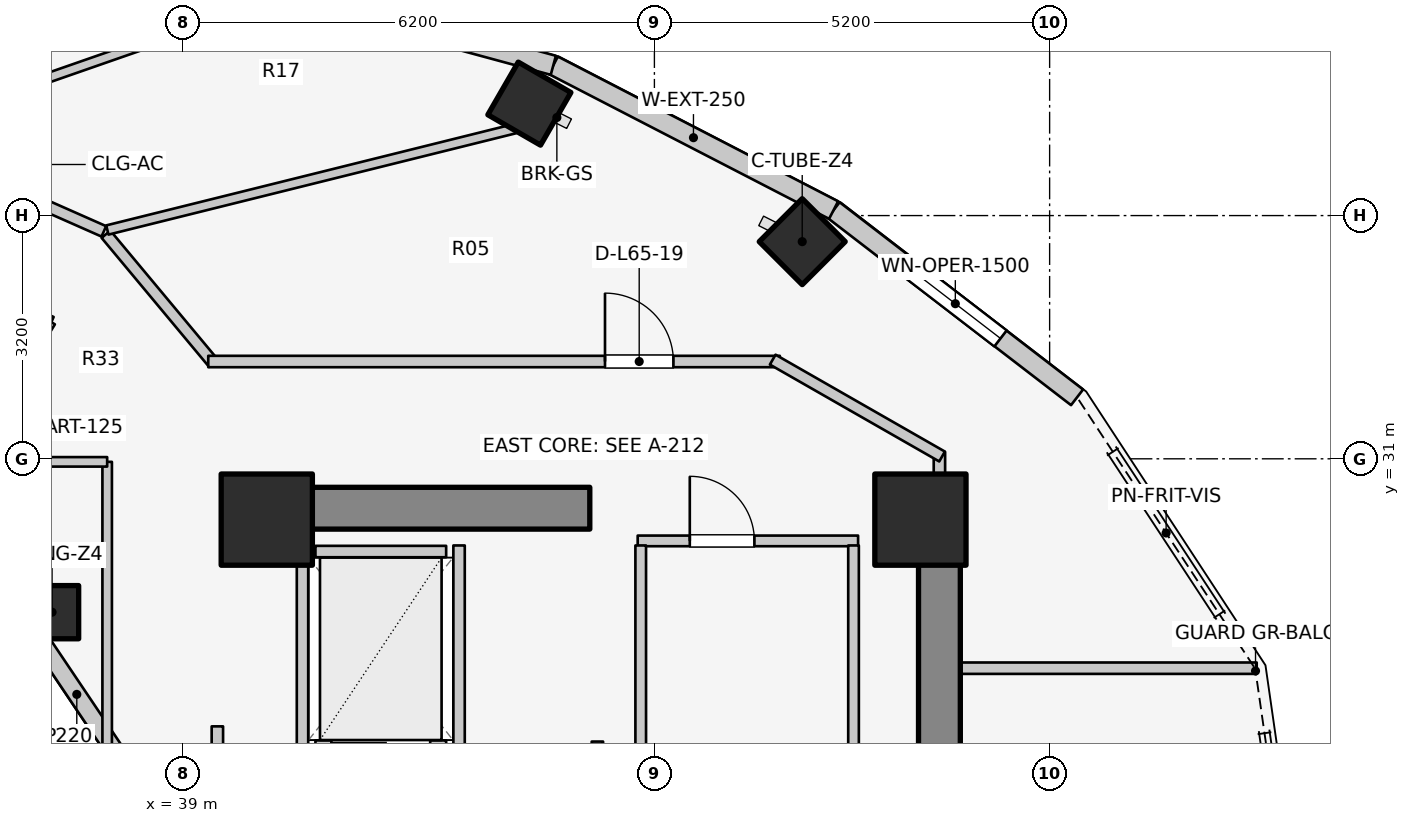
"""IFC4 building model, lengths in metres.
Left out: names, types, materials, properties, quantities, classifications, styles, units other than length and angle.
Written with IfcOpenShell. Run it as: python <this file> out.ifc"""

import sys

from ifc_helpers import new_model, si_unit, direction, frame, frame_2d, origin, origin_2d, place, context, subcontext, project, spatial, rectangle, extrude, element, fill, save


model = new_model("IFC4")
c1 = context("Model", 3, precision=1e-05, world=origin(), true_north=direction((0.0, 1.0)))
c2 = subcontext(c1, "Body", "Model", "MODEL_VIEW")
j1 = project(units=[si_unit("LENGTHUNIT", "METRE"), si_unit("PLANEANGLEUNIT", "RADIAN")], contexts=[c1])
p1 = place(None, origin())
s1 = spatial("IfcSite", under=j1, at=p1, CompositionType="ELEMENT")
p2 = place(p1, origin())
s2 = spatial("IfcBuilding", under=s1, at=p2, CompositionType="ELEMENT")
p3 = place(p2, frame((0.0, 0.0, 214.0)))
s3 = spatial("IfcBuildingStorey", under=s2, at=p3, CompositionType="ELEMENT", Elevation=214.0)
p4 = place(p3, frame((48.95, 17.05, 0.0), z_axis=(0.0, 0.0, 1.0), x_axis=(0.0, 1.0, 0.0)))
e1 = element("IfcWall", 1, at=p4, inside=s3, PredefinedType="SHEAR", context=c2, shape_type="SweptSolid", body=[
    extrude(rectangle(XDim=12.8, YDim=0.55, at=frame_2d((6.4, 0.0))), origin(), (0.0, 0.0, 1.0), 3.1),
])
p5 = place(p3, frame((39.85, 30.35, 0.0), z_axis=(0.0, 0.0, 1.0), x_axis=(1.0, 0.0, 0.0)))
e2 = element("IfcWall", 2, at=p5, inside=s3, PredefinedType="SHEAR", context=c2, shape_type="SweptSolid", body=[
    extrude(rectangle(XDim=4.5, YDim=0.55, at=frame_2d((2.25, 0.0))), origin(), (0.0, 0.0, 1.0), 3.1),
])
for number, where, z_axis, x_axis in (
    (3, (48.7, 30.2, 0.0), (0.0, 0.0, 1.0), (1.0, 0.0, 0.0)),
    (4, (40.1, 30.2, 0.0), (0.0, 0.0, 1.0), (1.0, 0.0, 0.0)),
):
    element("IfcColumn", number, at=place(p3, frame(where, z_axis=z_axis, x_axis=x_axis)), inside=s3, PredefinedType="COLUMN", context=c2, shape_type="SweptSolid", body=[
        extrude(rectangle(XDim=1.2, YDim=1.2, at=origin_2d()), origin(), (0.0, 0.0, 1.0), 3.1),
    ])
p6 = place(p3, frame((37.275, 28.982, 0.0), z_axis=(0.0, 0.0, 1.0), x_axis=(1.0, 0.0, 0.0)))
e5 = element("IfcColumn", 5, at=p6, inside=s3, PredefinedType="COLUMN", context=c2, shape_type="SweptSolid", body=[
    extrude(rectangle(XDim=0.7, YDim=0.7, at=origin_2d()), origin(), (0.0, 0.0, 1.0), 3.1),
])
for number, where, z_axis, x_axis in (
    (6, (47.145, 33.857, 0.0), (0.0, 0.0, 1.0), (0.707, 0.707, 0.0)),
    (7, (43.555, 35.673, 0.0), (0.0, 0.0, 1.0), (0.5, 0.866, 0.0)),
):
    element("IfcColumn", number, at=place(p3, frame(where, z_axis=z_axis, x_axis=x_axis)), inside=s3, PredefinedType="COLUMN", context=c2, shape_type="SweptSolid", body=[
        extrude(rectangle(XDim=0.8, YDim=0.8, at=origin_2d()), origin(), (0.0, 0.0, 1.0), 3.1),
    ])
p7 = place(p3, frame((38.166, 27.06, 0.0), z_axis=(0.0, 0.0, 1.0), x_axis=(-0.558197800898, 0.829707909492, 0.0)))
e8 = element("IfcWall", 8, at=p7, inside=s3, PredefinedType="STANDARD", context=c2, shape_type="SweptSolid", body=[
    extrude(rectangle(XDim=2.027, YDim=0.23, at=frame_2d((1.013, 0.0))), origin(), (0.0, 0.0, 1.0), 2.16),
])
p8 = place(p3, frame((50.761, 31.809, 0.0), z_axis=(0.0, 0.0, 1.0), x_axis=(-0.792713817907, 0.609593965603, 0.0)))
e9 = element("IfcWall", 9, at=p8, inside=s3, PredefinedType="STANDARD", context=c2, shape_type="SweptSolid", body=[
    extrude(rectangle(XDim=4.041, YDim=0.26, at=frame_2d((2.021, 0.0))), origin(), (0.0, 0.0, 1.0), 2.85),
])
p9 = place(p8, frame((1.271, 0.0, 0.75)))
e10 = element("IfcOpeningElement", 10, at=p9, cuts=e9, PredefinedType="OPENING", context=c2, shape_type="SweptSolid", body=[
    extrude(rectangle(XDim=1.5, YDim=1.6, at=frame_2d((0.75, 0.8))), frame((0.0, 0.14, 0.0), z_axis=(0.0, -1.0, 0.0), x_axis=(1.0, 0.0, 0.0)), (0.0, 0.0, 1.0), 0.28),
])
p10 = place(p3, frame((47.558, 34.272, 0.0), z_axis=(0.0, 0.0, 1.0), x_axis=(-0.88849146803, 0.458893137057, 0.0)))
e11 = element("IfcWall", 11, at=p10, inside=s3, PredefinedType="STANDARD", context=c2, shape_type="SweptSolid", body=[
    extrude(rectangle(XDim=4.15, YDim=0.26, at=frame_2d((2.075, 0.0))), origin(), (0.0, 0.0, 1.0), 2.85),
])
p11 = place(p3, frame((43.87, 36.177, 0.0), z_axis=(0.0, 0.0, 1.0), x_axis=(-0.965213026382, 0.261464746576, 0.0)))
e12 = element("IfcWall", 12, at=p11, inside=s3, PredefinedType="STANDARD", context=c2, shape_type="SweptSolid", body=[
    extrude(rectangle(XDim=5.001, YDim=0.26, at=frame_2d((2.5, 0.0))), origin(), (0.0, 0.0, 1.0), 2.85),
])
p12 = place(p11, frame((1.301, 0.0, 0.75)))
e13 = element("IfcOpeningElement", 13, at=p12, cuts=e12, PredefinedType="OPENING", context=c2, shape_type="SweptSolid", body=[
    extrude(rectangle(XDim=2.4, YDim=1.7, at=frame_2d((1.2, 0.85))), frame((0.0, 0.14, 0.0), z_axis=(0.0, -1.0, 0.0), x_axis=(1.0, 0.0, 0.0)), (0.0, 0.0, 1.0), 0.28),
])
p13 = place(p3, frame((40.74, 27.22, 0.0), z_axis=(0.0, 0.0, 1.0), x_axis=(1.0, 0.0, 0.0)))
e14 = element("IfcWall", 14, at=p13, inside=s3, PredefinedType="SOLIDWALL", context=c2, shape_type="SweptSolid", body=[
    extrude(rectangle(XDim=1.72, YDim=0.15, at=frame_2d((0.86, 0.0))), origin(), (0.0, 0.0, 1.0), 2.855),
])
p14 = place(p13, frame((0.21, 0.0, 0.0)))
e15 = element("IfcOpeningElement", 15, at=p14, cuts=e14, PredefinedType="OPENING", context=c2, shape_type="SweptSolid", body=[
    extrude(rectangle(XDim=1.3, YDim=2.1, at=frame_2d((0.65, 1.05))), frame((0.0, 0.085, 0.0), z_axis=(0.0, -1.0, 0.0), x_axis=(1.0, 0.0, 0.0)), (0.0, 0.0, 1.0), 0.17),
])
p15 = place(p3, frame((40.74, 29.78, 0.0), z_axis=(0.0, 0.0, 1.0), x_axis=(1.0, 0.0, 0.0)))
e16 = element("IfcWall", 16, at=p15, inside=s3, PredefinedType="SOLIDWALL", context=c2, shape_type="SweptSolid", body=[
    extrude(rectangle(XDim=1.72, YDim=0.15, at=frame_2d((0.86, 0.0))), origin(), (0.0, 0.0, 1.0), 2.855),
])
for number, where, z_axis, x_axis in (
    (17, (40.57, 27.14, 0.0), (0.0, 0.0, 1.0), (0.0, 1.0, 0.0)),
    (18, (42.63, 27.14, 0.0), (0.0, 0.0, 1.0), (0.0, 1.0, 0.0)),
):
    element("IfcWall", number, at=place(p3, frame(where, z_axis=z_axis, x_axis=x_axis)), inside=s3, PredefinedType="SOLIDWALL", context=c2, shape_type="SweptSolid", body=[
        extrude(rectangle(XDim=2.72, YDim=0.15, at=frame_2d((1.36, 0.0))), origin(), (0.0, 0.0, 1.0), 2.855),
    ])
p16 = place(p3, frame((44.45, 24.08, 0.0), z_axis=(0.0, 0.0, 1.0), x_axis=(0.0, 1.0, 0.0)))
e19 = element("IfcWall", 19, at=p16, inside=s3, PredefinedType="PARTITIONING", context=c2, shape_type="SweptSolid", body=[
    extrude(rectangle(XDim=3.2, YDim=0.15, at=frame_2d((1.6, 0.0))), origin(), (0.0, 0.0, 1.0), 2.855),
])
p17 = place(p3, frame((39.45, 24.08, 0.0), z_axis=(0.0, 0.0, 1.0), x_axis=(0.0, 1.0, 0.0)))
e20 = element("IfcWall", 20, at=p17, inside=s3, PredefinedType="PARTITIONING", context=c2, shape_type="SweptSolid", body=[
    extrude(rectangle(XDim=3.4, YDim=0.15, at=frame_2d((1.7, 0.0))), origin(), (0.0, 0.0, 1.0), 2.855),
])
p18 = place(p17, frame((1.894, 0.0, 0.0)))
e21 = element("IfcOpeningElement", 21, at=p18, cuts=e20, PredefinedType="OPENING", context=c2, shape_type="SweptSolid", body=[
    extrude(rectangle(XDim=1.1, YDim=2.1, at=frame_2d((0.55, 1.05))), frame((0.0, 0.085, 0.0), z_axis=(0.0, -1.0, 0.0), x_axis=(1.0, 0.0, 0.0)), (0.0, 0.0, 1.0), 0.17),
])
p19 = place(p3, frame((44.98, 29.92, 0.0), z_axis=(0.0, 0.0, 1.0), x_axis=(1.0, 0.0, 0.0)))
e22 = element("IfcWall", 22, at=p19, inside=s3, PredefinedType="PLUMBINGWALL", context=c2, shape_type="SweptSolid", body=[
    extrude(rectangle(XDim=2.9, YDim=0.14, at=frame_2d((1.45, 0.0))), origin(), (0.0, 0.0, 1.0), 2.855),
])
p20 = place(p19, frame((0.686, 0.0, 0.0)))
e23 = element("IfcOpeningElement", 23, at=p20, cuts=e22, PredefinedType="OPENING", context=c2, shape_type="SweptSolid", body=[
    extrude(rectangle(XDim=0.85, YDim=2.05, at=frame_2d((0.425, 1.025))), frame((0.0, 0.08, 0.0), z_axis=(0.0, -1.0, 0.0), x_axis=(1.0, 0.0, 0.0)), (0.0, 0.0, 1.0), 0.16),
])
for number, where, z_axis, x_axis in (
    (24, (45.02, 25.98, 0.0), (0.0, 0.0, 1.0), (0.0, 1.0, 0.0)),
    (25, (47.82, 25.98, 0.0), (0.0, 0.0, 1.0), (0.0, 1.0, 0.0)),
):
    element("IfcWall", number, at=place(p3, frame(where, z_axis=z_axis, x_axis=x_axis)), inside=s3, PredefinedType="PLUMBINGWALL", context=c2, shape_type="SweptSolid", body=[
        extrude(rectangle(XDim=3.88, YDim=0.14, at=frame_2d((1.94, 0.0))), origin(), (0.0, 0.0, 1.0), 2.855),
    ])
p21 = place(p3, frame((35.55, 30.015, 0.0), z_axis=(0.0, 0.0, 1.0), x_axis=(0.522763432117, 0.852477796802, 0.0)))
e26 = element("IfcWall", 26, at=p21, inside=s3, PredefinedType="PARTITIONING", context=c2, shape_type="SweptSolid", body=[
    extrude(rectangle(XDim=3.269, YDim=0.125, at=frame_2d((1.635, 0.0))), origin(), (0.0, 0.0, 1.0), 2.376),
])
p22 = place(p3, frame((37.265, 32.798, 0.0), z_axis=(0.0, 0.0, 1.0), x_axis=(-0.913254317828, 0.407389924971, 0.0)))
e27 = element("IfcWall", 27, at=p22, inside=s3, PredefinedType="PARTITIONING", context=c2, shape_type="SweptSolid", body=[
    extrude(rectangle(XDim=2.787, YDim=0.15, at=frame_2d((1.393, 0.0))), origin(), (0.0, 0.0, 1.0), 2.376),
])
p23 = place(p3, frame((38.0, 25.8, 0.0), z_axis=(0.0, 0.0, 1.0), x_axis=(0.0, 1.0, 0.0)))
e28 = element("IfcWall", 28, at=p23, inside=s3, PredefinedType="PARTITIONING", context=c2, shape_type="SweptSolid", body=[
    extrude(rectangle(XDim=5.16, YDim=0.125, at=frame_2d((2.58, 0.0))), origin(), (0.0, 0.0, 1.0), 2.232),
])
p24 = place(p3, frame((35.4, 30.96, 0.0), z_axis=(0.0, 0.0, 1.0), x_axis=(1.0, 0.0, 0.0)))
e29 = element("IfcWall", 29, at=p24, inside=s3, PredefinedType="PARTITIONING", context=c2, shape_type="SweptSolid", body=[
    extrude(rectangle(XDim=2.6, YDim=0.125, at=frame_2d((1.3, 0.0))), origin(), (0.0, 0.0, 1.0), 2.376),
])
p25 = place(p3, frame((48.95, 28.245, 0.0), z_axis=(0.0, 0.0, 1.0), x_axis=(1.0, 0.0, 0.0)))
e30 = element("IfcWall", 30, at=p25, inside=s3, PredefinedType="PARTITIONING", context=c2, shape_type="SweptSolid", body=[
    extrude(rectangle(XDim=4.175, YDim=0.15, at=frame_2d((2.087, 0.0))), origin(), (0.0, 0.0, 1.0), 2.855),
])
p26 = place(p3, frame((48.95, 29.8, 0.0), z_axis=(0.0, 0.0, 1.0), x_axis=(0.0, 1.0, 0.0)))
e31 = element("IfcWall", 31, at=p26, inside=s3, PredefinedType="PARTITIONING", context=c2, shape_type="SweptSolid", body=[
    extrude(rectangle(XDim=1.29, YDim=0.15, at=frame_2d((0.645, 0.0))), origin(), (0.0, 0.0, 1.0), 2.855),
])
p27 = place(p3, frame((37.984, 33.955, 0.0), z_axis=(0.0, 0.0, 1.0), x_axis=(0.64030392053, -0.76812166312, 0.0)))
e32 = element("IfcWall", 32, at=p27, inside=s3, PredefinedType="PARTITIONING", context=c2, shape_type="SweptSolid", body=[
    extrude(rectangle(XDim=2.21, YDim=0.15, at=frame_2d((1.105, 0.0))), origin(), (0.0, 0.0, 1.0), 2.376),
])
p28 = place(p3, frame((39.33, 32.28, 0.0), z_axis=(0.0, 0.0, 1.0), x_axis=(1.0, 0.0, 0.0)))
e33 = element("IfcWall", 33, at=p28, inside=s3, PredefinedType="PARTITIONING", context=c2, shape_type="SweptSolid", body=[
    extrude(rectangle(XDim=7.52, YDim=0.15, at=frame_2d((3.76, 0.0))), origin(), (0.0, 0.0, 1.0), 2.376),
])
p29 = place(p28, frame((5.22, 0.0, 0.0)))
e34 = element("IfcOpeningElement", 34, at=p29, cuts=e33, PredefinedType="OPENING", context=c2, shape_type="SweptSolid", body=[
    extrude(rectangle(XDim=0.9, YDim=2.1, at=frame_2d((0.45, 1.05))), frame((0.0, 0.085, 0.0), z_axis=(0.0, -1.0, 0.0), x_axis=(1.0, 0.0, 0.0)), (0.0, 0.0, 1.0), 0.17),
])
p30 = place(p3, frame((46.757, 32.305, 0.0), z_axis=(0.0, 0.0, 1.0), x_axis=(0.867991349648, -0.496579315857, 0.0)))
e35 = element("IfcWall", 35, at=p30, inside=s3, PredefinedType="PARTITIONING", context=c2, shape_type="SweptSolid", body=[
    extrude(rectangle(XDim=2.567, YDim=0.15, at=frame_2d((1.283, 0.0))), origin(), (0.0, 0.0, 1.0), 2.22),
])
p31 = place(p3, frame((38.002, 34.01, 0.0), z_axis=(0.0, 0.0, 1.0), x_axis=(0.970445810114, 0.241319144769, 0.0)))
e36 = element("IfcWall", 36, at=p31, inside=s3, PredefinedType="PARTITIONING", context=c2, shape_type="SweptSolid", body=[
    extrude(rectangle(XDim=5.526, YDim=0.125, at=frame_2d((2.763, 0.0))), origin(), (0.0, 0.0, 1.0), 2.376),
])
p32 = place(p3, frame((35.131, 35.283, 0.0), z_axis=(0.0, 0.0, 1.0), x_axis=(0.944311395416, 0.329053169697, 0.0)))
e37 = element("IfcWall", 37, at=p32, inside=s3, PredefinedType="PARTITIONING", context=c2, shape_type="SweptSolid", body=[
    extrude(rectangle(XDim=3.84, YDim=0.125, at=frame_2d((1.92, 0.0))), origin(), (0.0, 0.0, 1.0), 2.376),
])
p33 = place(p3, frame((37.956, 33.992, 0.0), z_axis=(0.0, 0.0, 1.0), x_axis=(-0.914642679993, 0.404263240891, 0.0)))
e38 = element("IfcWall", 38, at=p33, inside=s3, PredefinedType="PARTITIONING", context=c2, shape_type="SweptSolid", body=[
    extrude(rectangle(XDim=3.154, YDim=0.15, at=frame_2d((1.577, 0.0))), origin(), (0.0, 0.0, 1.0), 2.376),
])
p34 = place(p33, frame((1.077, 0.0, 0.0)))
e39 = element("IfcOpeningElement", 39, at=p34, cuts=e38, PredefinedType="OPENING", context=c2, shape_type="SweptSolid", body=[
    extrude(rectangle(XDim=1.0, YDim=2.1, at=frame_2d((0.5, 1.05))), frame((0.0, 0.085, 0.0), z_axis=(0.0, -1.0, 0.0), x_axis=(1.0, 0.0, 0.0)), (0.0, 0.0, 1.0), 0.17),
])
p35 = place(p9, origin())
e40 = element("IfcWindow", 40, at=p35, inside=s3, PartitioningType="SINGLE_PANEL", PredefinedType="WINDOW", context=c2, shape_type="SweptSolid", body=[
    extrude(rectangle(XDim=1.5, YDim=1.6, at=frame_2d((0.75, 0.8))), frame((0.0, 0.03, 0.0), z_axis=(0.0, -1.0, 0.0), x_axis=(1.0, 0.0, 0.0)), (0.0, 0.0, 1.0), 0.06),
])
fill(e10, e40)
p36 = place(p20, origin())
e41 = element("IfcDoor", 41, at=p36, inside=s3, OperationType="SINGLE_SWING_LEFT", PredefinedType="DOOR", context=c2, shape_type="SweptSolid", body=[
    extrude(rectangle(XDim=0.85, YDim=2.05, at=frame_2d((0.425, 1.025))), frame((0.0, 0.025, 0.0), z_axis=(0.0, -1.0, 0.0), x_axis=(1.0, 0.0, 0.0)), (0.0, 0.0, 1.0), 0.05),
])
fill(e23, e41)
p37 = place(p29, origin())
e42 = element("IfcDoor", 42, at=p37, inside=s3, OperationType="SINGLE_SWING_LEFT", PredefinedType="DOOR", context=c2, shape_type="SweptSolid", body=[
    extrude(rectangle(XDim=0.9, YDim=2.1, at=frame_2d((0.45, 1.05))), frame((0.0, 0.025, 0.0), z_axis=(0.0, -1.0, 0.0), x_axis=(1.0, 0.0, 0.0)), (0.0, 0.0, 1.0), 0.05),
])
fill(e34, e42)
save(model, sys.argv[1])
